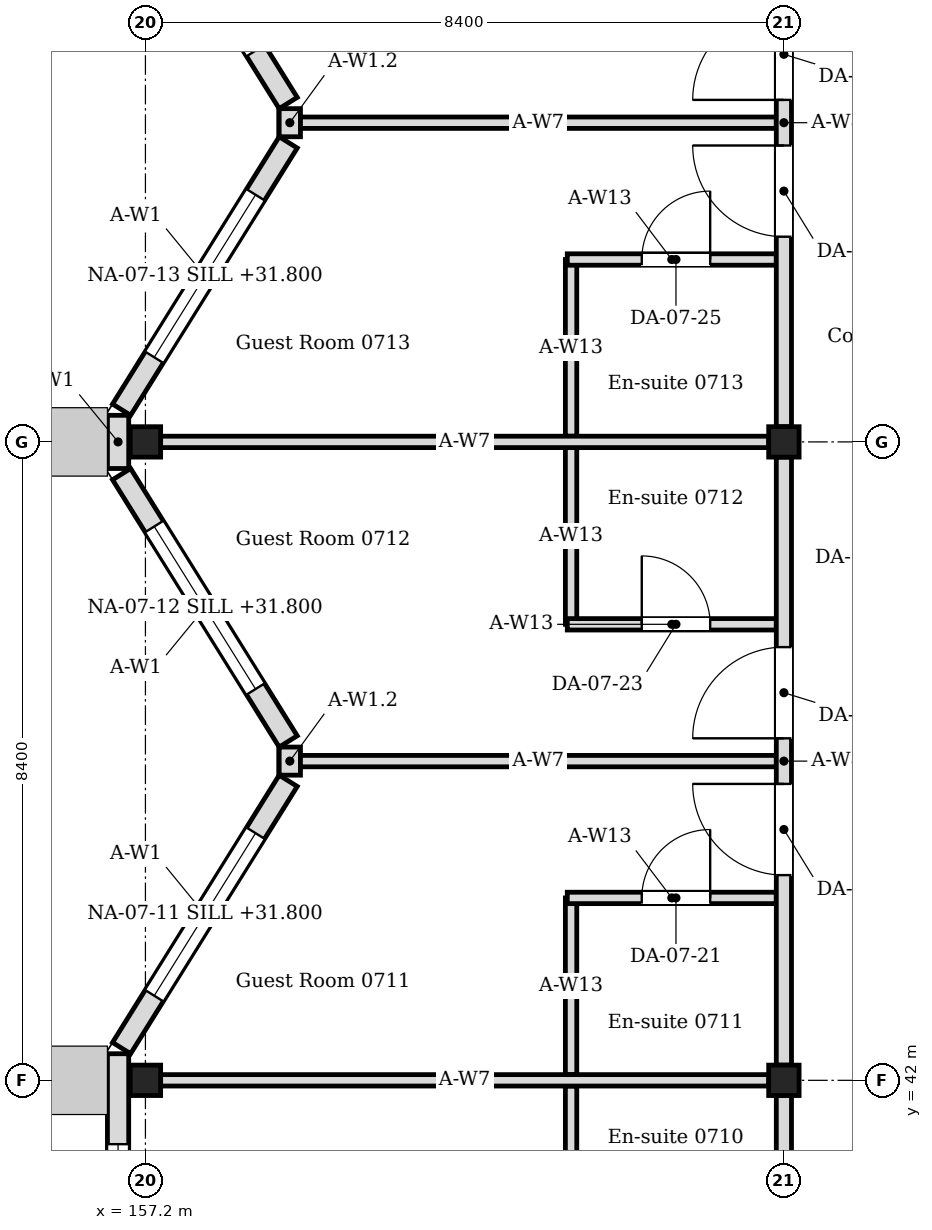
"""IFC4 building model, lengths in metres.
Left out: names, types, materials, properties, quantities, classifications, styles, units other than length and angle.
Written with IfcOpenShell. Run it as: python <this file> out.ifc"""

import sys

from ifc_helpers import new_model, si_unit, direction, frame, frame_2d, origin, origin_2d, place, context, subcontext, project, spatial, rectangle, i_section, extrude, element, fill, save


model = new_model("IFC4")
c1 = context("Model", 3, precision=1e-05, world=origin(), true_north=direction((0.0, 1.0)))
c2 = subcontext(c1, "Body", "Model", "MODEL_VIEW")
j1 = project(units=[si_unit("LENGTHUNIT", "METRE"), si_unit("PLANEANGLEUNIT", "RADIAN")], contexts=[c1])
p1 = place(None, origin())
s1 = spatial("IfcSite", under=j1, at=p1, CompositionType="ELEMENT")
p2 = place(p1, origin())
s2 = spatial("IfcBuilding", under=s1, at=p2, CompositionType="ELEMENT")
p3 = place(p2, frame((0.0, 0.0, 31.2)))
s3 = spatial("IfcBuildingStorey", under=s2, at=p3, CompositionType="ELEMENT", Elevation=31.2)
for number, where, z_axis, x_axis in (
    (1, (157.2, 42.0, 0.0), (0.0, 0.0, 1.0), (1.0, 0.0, 0.0)),
    (2, (157.2, 50.4, 0.0), (0.0, 0.0, 1.0), (1.0, 0.0, 0.0)),
    (3, (165.6, 42.0, 0.0), (0.0, 0.0, 1.0), (1.0, 0.0, 0.0)),
    (4, (165.6, 50.4, 0.0), (0.0, 0.0, 1.0), (1.0, 0.0, 0.0)),
):
    element("IfcColumn", number, at=place(p3, frame(where, z_axis=z_axis, x_axis=x_axis)), inside=s3, PredefinedType="COLUMN", context=c2, shape_type="SweptSolid", body=[
        extrude(i_section(OverallWidth=0.4, OverallDepth=0.4, WebThickness=0.013, FlangeThickness=0.021, FilletRadius=0.022, at=origin_2d()), origin(), (0.0, 0.0, 1.0), 4.2),
    ])
p4 = place(p3, frame((156.84, 16.45, 0.0), z_axis=(0.0, 0.0, 1.0), x_axis=(0.0, 1.0, 0.0)))
e5 = element("IfcWall", 5, at=p4, inside=s3, PredefinedType="SOLIDWALL", context=c2, shape_type="SweptSolid", body=[
    extrude(rectangle(XDim=25.9, YDim=0.28, at=frame_2d((12.95, 0.0))), origin(), (0.0, 0.0, 1.0), 4.05),
])
p5 = place(p4, frame((1.19, 0.0, 0.6)))
e6 = element("IfcOpeningElement", 6, at=p5, cuts=e5, PredefinedType="OPENING", context=c2, shape_type="SweptSolid", body=[
    extrude(rectangle(XDim=2.52, YDim=2.4, at=frame_2d((1.26, 1.2))), frame((0.0, 0.15, 0.0), z_axis=(0.0, -1.0, 0.0), x_axis=(1.0, 0.0, 0.0)), (0.0, 0.0, 1.0), 0.3),
])
p6 = place(p4, frame((5.39, 0.0, 0.6)))
e7 = element("IfcOpeningElement", 7, at=p6, cuts=e5, PredefinedType="OPENING", context=c2, shape_type="SweptSolid", body=[
    extrude(rectangle(XDim=2.52, YDim=2.4, at=frame_2d((1.26, 1.2))), frame((0.0, 0.15, 0.0), z_axis=(0.0, -1.0, 0.0), x_axis=(1.0, 0.0, 0.0)), (0.0, 0.0, 1.0), 0.3),
])
p7 = place(p4, frame((9.59, 0.0, 0.6)))
e8 = element("IfcOpeningElement", 8, at=p7, cuts=e5, PredefinedType="OPENING", context=c2, shape_type="SweptSolid", body=[
    extrude(rectangle(XDim=2.52, YDim=2.4, at=frame_2d((1.26, 1.2))), frame((0.0, 0.15, 0.0), z_axis=(0.0, -1.0, 0.0), x_axis=(1.0, 0.0, 0.0)), (0.0, 0.0, 1.0), 0.3),
])
p8 = place(p4, frame((13.79, 0.0, 0.6)))
e9 = element("IfcOpeningElement", 9, at=p8, cuts=e5, PredefinedType="OPENING", context=c2, shape_type="SweptSolid", body=[
    extrude(rectangle(XDim=2.52, YDim=2.4, at=frame_2d((1.26, 1.2))), frame((0.0, 0.15, 0.0), z_axis=(0.0, -1.0, 0.0), x_axis=(1.0, 0.0, 0.0)), (0.0, 0.0, 1.0), 0.3),
])
p9 = place(p4, frame((17.99, 0.0, 0.45)))
e10 = element("IfcOpeningElement", 10, at=p9, cuts=e5, PredefinedType="OPENING", context=c2, shape_type="SweptSolid", body=[
    extrude(rectangle(XDim=2.52, YDim=2.1, at=frame_2d((1.26, 1.05))), frame((0.0, 0.15, 0.0), z_axis=(0.0, -1.0, 0.0), x_axis=(1.0, 0.0, 0.0)), (0.0, 0.0, 1.0), 0.3),
])
p10 = place(p4, frame((22.19, 0.0, 0.6)))
e11 = element("IfcOpeningElement", 11, at=p10, cuts=e5, PredefinedType="OPENING", context=c2, shape_type="SweptSolid", body=[
    extrude(rectangle(XDim=2.52, YDim=2.4, at=frame_2d((1.26, 1.2))), frame((0.0, 0.15, 0.0), z_axis=(0.0, -1.0, 0.0), x_axis=(1.0, 0.0, 0.0)), (0.0, 0.0, 1.0), 0.3),
])
p11 = place(p3, frame((156.886, 42.424, 0.0), z_axis=(0.0, 0.0, 1.0), x_axis=(0.529018946142, 0.848610013271, 0.0)))
e12 = element("IfcWall", 12, at=p11, inside=s3, PredefinedType="SOLIDWALL", context=c2, shape_type="SweptSolid", body=[
    extrude(rectangle(XDim=4.144, YDim=0.28, at=frame_2d((2.072, 0.0))), origin(), (0.0, 0.0, 1.0), 4.05),
])
p12 = place(p11, frame((0.812, 0.0, 0.6)))
e13 = element("IfcOpeningElement", 13, at=p12, cuts=e12, PredefinedType="OPENING", context=c2, shape_type="SweptSolid", body=[
    extrude(rectangle(XDim=2.52, YDim=2.4, at=frame_2d((1.26, 1.2))), frame((0.0, 0.15, 0.0), z_axis=(0.0, -1.0, 0.0), x_axis=(1.0, 0.0, 0.0)), (0.0, 0.0, 1.0), 0.3),
])
p13 = place(p3, frame((159.079, 46.459, 0.0), z_axis=(0.0, 0.0, 1.0), x_axis=(-0.529018946142, 0.848610013271, 0.0)))
e14 = element("IfcWall", 14, at=p13, inside=s3, PredefinedType="SOLIDWALL", context=c2, shape_type="SweptSolid", body=[
    extrude(rectangle(XDim=4.144, YDim=0.28, at=frame_2d((2.072, 0.0))), origin(), (0.0, 0.0, 1.0), 4.05),
])
p14 = place(p13, frame((0.812, 0.0, 0.6)))
e15 = element("IfcOpeningElement", 15, at=p14, cuts=e14, PredefinedType="OPENING", context=c2, shape_type="SweptSolid", body=[
    extrude(rectangle(XDim=2.52, YDim=2.4, at=frame_2d((1.26, 1.2))), frame((0.0, 0.15, 0.0), z_axis=(0.0, -1.0, 0.0), x_axis=(1.0, 0.0, 0.0)), (0.0, 0.0, 1.0), 0.3),
])
p15 = place(p3, frame((159.1, 46.015, 0.0), z_axis=(0.0, 0.0, 1.0), x_axis=(0.0, 1.0, 0.0)))
e16 = element("IfcWall", 16, at=p15, inside=s3, PredefinedType="SOLIDWALL", context=c2, shape_type="SweptSolid", body=[
    extrude(rectangle(XDim=0.37, YDim=0.28, at=frame_2d((0.185, 0.0))), origin(), (0.0, 0.0, 1.0), 3.604),
])
p16 = place(p3, frame((156.84, 50.05, 0.0), z_axis=(0.0, 0.0, 1.0), x_axis=(0.0, 1.0, 0.0)))
e17 = element("IfcWall", 17, at=p16, inside=s3, PredefinedType="SOLIDWALL", context=c2, shape_type="SweptSolid", body=[
    extrude(rectangle(XDim=0.7, YDim=0.28, at=frame_2d((0.35, 0.0))), origin(), (0.0, 0.0, 1.0), 4.05),
])
p17 = place(p3, frame((156.886, 50.824, 0.0), z_axis=(0.0, 0.0, 1.0), x_axis=(0.529018946142, 0.848610013271, 0.0)))
e18 = element("IfcWall", 18, at=p17, inside=s3, PredefinedType="SOLIDWALL", context=c2, shape_type="SweptSolid", body=[
    extrude(rectangle(XDim=4.144, YDim=0.28, at=frame_2d((2.072, 0.0))), origin(), (0.0, 0.0, 1.0), 4.05),
])
p18 = place(p17, frame((0.812, 0.0, 0.6)))
e19 = element("IfcOpeningElement", 19, at=p18, cuts=e18, PredefinedType="OPENING", context=c2, shape_type="SweptSolid", body=[
    extrude(rectangle(XDim=2.52, YDim=2.4, at=frame_2d((1.26, 1.2))), frame((0.0, 0.15, 0.0), z_axis=(0.0, -1.0, 0.0), x_axis=(1.0, 0.0, 0.0)), (0.0, 0.0, 1.0), 0.3),
])
p19 = place(p3, frame((159.079, 54.859, 0.0), z_axis=(0.0, 0.0, 1.0), x_axis=(-0.528992500338, 0.848626498871, 0.0)))
e20 = element("IfcWall", 20, at=p19, inside=s3, PredefinedType="SOLIDWALL", context=c2, shape_type="SweptSolid", body=[
    extrude(rectangle(XDim=4.145, YDim=0.28, at=frame_2d((2.072, 0.0))), origin(), (0.0, 0.0, 1.0), 4.05),
])
p20 = place(p19, frame((0.812, 0.0, 0.6)))
e21 = element("IfcOpeningElement", 21, at=p20, cuts=e20, PredefinedType="OPENING", context=c2, shape_type="SweptSolid", body=[
    extrude(rectangle(XDim=2.52, YDim=2.4, at=frame_2d((1.26, 1.2))), frame((0.0, 0.15, 0.0), z_axis=(0.0, -1.0, 0.0), x_axis=(1.0, 0.0, 0.0)), (0.0, 0.0, 1.0), 0.3),
])
p21 = place(p3, frame((159.1, 54.415, 0.0), z_axis=(0.0, 0.0, 1.0), x_axis=(0.0, 1.0, 0.0)))
e22 = element("IfcWall", 22, at=p21, inside=s3, PredefinedType="SOLIDWALL", context=c2, shape_type="SweptSolid", body=[
    extrude(rectangle(XDim=0.37, YDim=0.28, at=frame_2d((0.185, 0.0))), origin(), (0.0, 0.0, 1.0), 3.604),
])
for number, where, z_axis, x_axis in (
    (23, (162.8, 39.6, 0.0), (0.0, 0.0, 1.0), (0.0, 1.0, 0.0)),
    (24, (162.8, 42.075, 0.0), (0.0, 0.0, 1.0), (0.0, 1.0, 0.0)),
):
    element("IfcWall", number, at=place(p3, frame(where, z_axis=z_axis, x_axis=x_axis)), inside=s3, PredefinedType="PARTITIONING", context=c2, shape_type="SweptSolid", body=[
        extrude(rectangle(XDim=2.325, YDim=0.15, at=frame_2d((1.163, 0.0))), origin(), (0.0, 0.0, 1.0), 4.05),
    ])
p22 = place(p3, frame((162.75, 44.4, 0.0), z_axis=(0.0, 0.0, 1.0), x_axis=(1.0, 0.0, 0.0)))
e25 = element("IfcWall", 25, at=p22, inside=s3, PredefinedType="PARTITIONING", context=c2, shape_type="SweptSolid", body=[
    extrude(rectangle(XDim=2.75, YDim=0.15, at=frame_2d((1.375, 0.0))), origin(), (0.0, 0.0, 1.0), 4.05),
])
p23 = place(p22, frame((0.98, 0.0, 0.0)))
e26 = element("IfcOpeningElement", 26, at=p23, cuts=e25, PredefinedType="OPENING", context=c2, shape_type="SweptSolid", body=[
    extrude(rectangle(XDim=0.9, YDim=2.1, at=frame_2d((0.45, 1.05))), frame((0.0, 0.085, 0.0), z_axis=(0.0, -1.0, 0.0), x_axis=(1.0, 0.0, 0.0)), (0.0, 0.0, 1.0), 0.17),
])
p24 = place(p3, frame((162.8, 48.0, 0.0), z_axis=(0.0, 0.0, 1.0), x_axis=(0.0, 1.0, 0.0)))
e27 = element("IfcWall", 27, at=p24, inside=s3, PredefinedType="PARTITIONING", context=c2, shape_type="SweptSolid", body=[
    extrude(rectangle(XDim=2.325, YDim=0.15, at=frame_2d((1.163, 0.0))), origin(), (0.0, 0.0, 1.0), 4.05),
])
p25 = place(p3, frame((162.75, 48.0, 0.0), z_axis=(0.0, 0.0, 1.0), x_axis=(1.0, 0.0, 0.0)))
e28 = element("IfcWall", 28, at=p25, inside=s3, PredefinedType="PARTITIONING", context=c2, shape_type="SweptSolid", body=[
    extrude(rectangle(XDim=2.75, YDim=0.15, at=frame_2d((1.375, 0.0))), origin(), (0.0, 0.0, 1.0), 4.05),
])
p26 = place(p25, frame((0.98, 0.0, 0.0)))
e29 = element("IfcOpeningElement", 29, at=p26, cuts=e28, PredefinedType="OPENING", context=c2, shape_type="SweptSolid", body=[
    extrude(rectangle(XDim=0.9, YDim=2.1, at=frame_2d((0.45, 1.05))), frame((0.0, 0.085, 0.0), z_axis=(0.0, -1.0, 0.0), x_axis=(1.0, 0.0, 0.0)), (0.0, 0.0, 1.0), 0.17),
])
p27 = place(p3, frame((162.8, 50.475, 0.0), z_axis=(0.0, 0.0, 1.0), x_axis=(0.0, 1.0, 0.0)))
e30 = element("IfcWall", 30, at=p27, inside=s3, PredefinedType="PARTITIONING", context=c2, shape_type="SweptSolid", body=[
    extrude(rectangle(XDim=2.325, YDim=0.15, at=frame_2d((1.163, 0.0))), origin(), (0.0, 0.0, 1.0), 4.05),
])
p28 = place(p3, frame((162.75, 52.8, 0.0), z_axis=(0.0, 0.0, 1.0), x_axis=(1.0, 0.0, 0.0)))
e31 = element("IfcWall", 31, at=p28, inside=s3, PredefinedType="PARTITIONING", context=c2, shape_type="SweptSolid", body=[
    extrude(rectangle(XDim=2.75, YDim=0.15, at=frame_2d((1.375, 0.0))), origin(), (0.0, 0.0, 1.0), 4.05),
])
p29 = place(p28, frame((0.98, 0.0, 0.0)))
e32 = element("IfcOpeningElement", 32, at=p29, cuts=e31, PredefinedType="OPENING", context=c2, shape_type="SweptSolid", body=[
    extrude(rectangle(XDim=0.9, YDim=2.1, at=frame_2d((0.45, 1.05))), frame((0.0, 0.085, 0.0), z_axis=(0.0, -1.0, 0.0), x_axis=(1.0, 0.0, 0.0)), (0.0, 0.0, 1.0), 0.17),
])
for number, where, z_axis, x_axis in (
    (33, (157.4, 42.0, 0.0), (0.0, 0.0, 1.0), (1.0, 0.0, 0.0)),
    (34, (157.4, 50.4, 0.0), (0.0, 0.0, 1.0), (1.0, 0.0, 0.0)),
):
    element("IfcWall", number, at=place(p3, frame(where, z_axis=z_axis, x_axis=x_axis)), inside=s3, PredefinedType="PARTITIONING", context=c2, shape_type="SweptSolid", body=[
        extrude(rectangle(XDim=8.0, YDim=0.15, at=frame_2d((4.0, 0.0))), origin(), (0.0, 0.0, 1.0), 3.604),
    ])
for number, where, z_axis, x_axis in (
    (35, (159.24, 46.2, 0.0), (0.0, 0.0, 1.0), (1.0, 0.0, 0.0)),
    (36, (159.24, 54.6, 0.0), (0.0, 0.0, 1.0), (1.0, 0.0, 0.0)),
):
    element("IfcWall", number, at=place(p3, frame(where, z_axis=z_axis, x_axis=x_axis)), inside=s3, PredefinedType="PARTITIONING", context=c2, shape_type="SweptSolid", body=[
        extrude(rectangle(XDim=6.26, YDim=0.15, at=frame_2d((3.13, 0.0))), origin(), (0.0, 0.0, 1.0), 3.604),
    ])
p30 = place(p3, frame((165.6, 33.8, 0.0), z_axis=(0.0, 0.0, 1.0), x_axis=(0.0, 1.0, 0.0)))
e37 = element("IfcWall", 37, at=p30, inside=s3, PredefinedType="PARTITIONING", context=c2, shape_type="SweptSolid", body=[
    extrude(rectangle(XDim=8.0, YDim=0.2, at=frame_2d((4.0, 0.0))), origin(), (0.0, 0.0, 1.0), 3.45),
])
p31 = place(p30, frame((2.725, 0.0, 0.0)))
e38 = element("IfcOpeningElement", 38, at=p31, cuts=e37, PredefinedType="OPENING", context=c2, shape_type="SweptSolid", body=[
    extrude(rectangle(XDim=1.15, YDim=2.1, at=frame_2d((0.575, 1.05))), frame((0.0, 0.11, 0.0), z_axis=(0.0, -1.0, 0.0), x_axis=(1.0, 0.0, 0.0)), (0.0, 0.0, 1.0), 0.22),
])
p32 = place(p30, frame((4.3, 0.0, 0.0)))
e39 = element("IfcOpeningElement", 39, at=p32, cuts=e37, PredefinedType="OPENING", context=c2, shape_type="SweptSolid", body=[
    extrude(rectangle(XDim=1.2, YDim=2.1, at=frame_2d((0.6, 1.05))), frame((0.0, 0.11, 0.0), z_axis=(0.0, -1.0, 0.0), x_axis=(1.0, 0.0, 0.0)), (0.0, 0.0, 1.0), 0.22),
])
p33 = place(p3, frame((165.6, 42.2, 0.0), z_axis=(0.0, 0.0, 1.0), x_axis=(0.0, 1.0, 0.0)))
e40 = element("IfcWall", 40, at=p33, inside=s3, PredefinedType="PARTITIONING", context=c2, shape_type="SweptSolid", body=[
    extrude(rectangle(XDim=8.0, YDim=0.2, at=frame_2d((4.0, 0.0))), origin(), (0.0, 0.0, 1.0), 3.45),
])
p34 = place(p33, frame((2.5, 0.0, 0.0)))
e41 = element("IfcOpeningElement", 41, at=p34, cuts=e40, PredefinedType="OPENING", context=c2, shape_type="SweptSolid", body=[
    extrude(rectangle(XDim=1.2, YDim=2.1, at=frame_2d((0.6, 1.05))), frame((0.0, 0.11, 0.0), z_axis=(0.0, -1.0, 0.0), x_axis=(1.0, 0.0, 0.0)), (0.0, 0.0, 1.0), 0.22),
])
p35 = place(p33, frame((4.3, 0.0, 0.0)))
e42 = element("IfcOpeningElement", 42, at=p35, cuts=e40, PredefinedType="OPENING", context=c2, shape_type="SweptSolid", body=[
    extrude(rectangle(XDim=1.2, YDim=2.1, at=frame_2d((0.6, 1.05))), frame((0.0, 0.11, 0.0), z_axis=(0.0, -1.0, 0.0), x_axis=(1.0, 0.0, 0.0)), (0.0, 0.0, 1.0), 0.22),
])
p36 = place(p3, frame((165.6, 50.6, 0.0), z_axis=(0.0, 0.0, 1.0), x_axis=(0.0, 1.0, 0.0)))
e43 = element("IfcWall", 43, at=p36, inside=s3, PredefinedType="PARTITIONING", context=c2, shape_type="SweptSolid", body=[
    extrude(rectangle(XDim=8.0, YDim=0.2, at=frame_2d((4.0, 0.0))), origin(), (0.0, 0.0, 1.0), 3.45),
])
p37 = place(p36, frame((2.5, 0.0, 0.0)))
e44 = element("IfcOpeningElement", 44, at=p37, cuts=e43, PredefinedType="OPENING", context=c2, shape_type="SweptSolid", body=[
    extrude(rectangle(XDim=1.2, YDim=2.1, at=frame_2d((0.6, 1.05))), frame((0.0, 0.11, 0.0), z_axis=(0.0, -1.0, 0.0), x_axis=(1.0, 0.0, 0.0)), (0.0, 0.0, 1.0), 0.22),
])
p38 = place(p36, frame((4.3, 0.0, 0.0)))
e45 = element("IfcOpeningElement", 45, at=p38, cuts=e43, PredefinedType="OPENING", context=c2, shape_type="SweptSolid", body=[
    extrude(rectangle(XDim=1.2, YDim=2.1, at=frame_2d((0.6, 1.05))), frame((0.0, 0.11, 0.0), z_axis=(0.0, -1.0, 0.0), x_axis=(1.0, 0.0, 0.0)), (0.0, 0.0, 1.0), 0.22),
])
p39 = place(p10, origin())
e46 = element("IfcWindow", 46, at=p39, inside=s3, PartitioningType="SINGLE_PANEL", PredefinedType="WINDOW", context=c2, shape_type="SweptSolid", body=[
    extrude(rectangle(XDim=2.52, YDim=2.4, at=frame_2d((1.26, 1.2))), frame((0.0, 0.03, 0.0), z_axis=(0.0, -1.0, 0.0), x_axis=(1.0, 0.0, 0.0)), (0.0, 0.0, 1.0), 0.06),
])
fill(e11, e46)
p40 = place(p12, origin())
e47 = element("IfcWindow", 47, at=p40, inside=s3, PartitioningType="SINGLE_PANEL", PredefinedType="WINDOW", context=c2, shape_type="SweptSolid", body=[
    extrude(rectangle(XDim=2.52, YDim=2.4, at=frame_2d((1.26, 1.2))), frame((0.0, 0.03, 0.0), z_axis=(0.0, -1.0, 0.0), x_axis=(1.0, 0.0, 0.0)), (0.0, 0.0, 1.0), 0.06),
])
fill(e13, e47)
p41 = place(p14, origin())
e48 = element("IfcWindow", 48, at=p41, inside=s3, PartitioningType="SINGLE_PANEL", PredefinedType="WINDOW", context=c2, shape_type="SweptSolid", body=[
    extrude(rectangle(XDim=2.52, YDim=2.4, at=frame_2d((1.26, 1.2))), frame((0.0, 0.03, 0.0), z_axis=(0.0, -1.0, 0.0), x_axis=(1.0, 0.0, 0.0)), (0.0, 0.0, 1.0), 0.06),
])
fill(e15, e48)
p42 = place(p18, origin())
e49 = element("IfcWindow", 49, at=p42, inside=s3, PartitioningType="SINGLE_PANEL", PredefinedType="WINDOW", context=c2, shape_type="SweptSolid", body=[
    extrude(rectangle(XDim=2.52, YDim=2.4, at=frame_2d((1.26, 1.2))), frame((0.0, 0.03, 0.0), z_axis=(0.0, -1.0, 0.0), x_axis=(1.0, 0.0, 0.0)), (0.0, 0.0, 1.0), 0.06),
])
fill(e19, e49)
p43 = place(p23, origin())
e50 = element("IfcDoor", 50, at=p43, inside=s3, OperationType="SINGLE_SWING_RIGHT", PredefinedType="DOOR", context=c2, shape_type="SweptSolid", body=[
    extrude(rectangle(XDim=0.9, YDim=2.1, at=frame_2d((0.45, 1.05))), frame((0.0, 0.025, 0.0), z_axis=(0.0, -1.0, 0.0), x_axis=(1.0, 0.0, 0.0)), (0.0, 0.0, 1.0), 0.05),
])
fill(e26, e50)
p44 = place(p34, origin())
e51 = element("IfcDoor", 51, at=p44, inside=s3, OperationType="SINGLE_SWING_RIGHT", PredefinedType="DOOR", context=c2, shape_type="SweptSolid", body=[
    extrude(rectangle(XDim=1.2, YDim=2.1, at=frame_2d((0.6, 1.05))), frame((0.0, 0.025, 0.0), z_axis=(0.0, -1.0, 0.0), x_axis=(1.0, 0.0, 0.0)), (0.0, 0.0, 1.0), 0.05),
])
fill(e41, e51)
p45 = place(p26, origin())
e52 = element("IfcDoor", 52, at=p45, inside=s3, OperationType="SINGLE_SWING_LEFT", PredefinedType="DOOR", context=c2, shape_type="SweptSolid", body=[
    extrude(rectangle(XDim=0.9, YDim=2.1, at=frame_2d((0.45, 1.05))), frame((0.0, 0.025, 0.0), z_axis=(0.0, -1.0, 0.0), x_axis=(1.0, 0.0, 0.0)), (0.0, 0.0, 1.0), 0.05),
])
fill(e29, e52)
p46 = place(p35, origin())
e53 = element("IfcDoor", 53, at=p46, inside=s3, OperationType="SINGLE_SWING_LEFT", PredefinedType="DOOR", context=c2, shape_type="SweptSolid", body=[
    extrude(rectangle(XDim=1.2, YDim=2.1, at=frame_2d((0.6, 1.05))), frame((0.0, 0.025, 0.0), z_axis=(0.0, -1.0, 0.0), x_axis=(1.0, 0.0, 0.0)), (0.0, 0.0, 1.0), 0.05),
])
fill(e42, e53)
p47 = place(p29, origin())
e54 = element("IfcDoor", 54, at=p47, inside=s3, OperationType="SINGLE_SWING_RIGHT", PredefinedType="DOOR", context=c2, shape_type="SweptSolid", body=[
    extrude(rectangle(XDim=0.9, YDim=2.1, at=frame_2d((0.45, 1.05))), frame((0.0, 0.025, 0.0), z_axis=(0.0, -1.0, 0.0), x_axis=(1.0, 0.0, 0.0)), (0.0, 0.0, 1.0), 0.05),
])
fill(e32, e54)
p48 = place(p37, origin())
e55 = element("IfcDoor", 55, at=p48, inside=s3, OperationType="SINGLE_SWING_RIGHT", PredefinedType="DOOR", context=c2, shape_type="SweptSolid", body=[
    extrude(rectangle(XDim=1.2, YDim=2.1, at=frame_2d((0.6, 1.05))), frame((0.0, 0.025, 0.0), z_axis=(0.0, -1.0, 0.0), x_axis=(1.0, 0.0, 0.0)), (0.0, 0.0, 1.0), 0.05),
])
fill(e44, e55)
p49 = place(p38, origin())
e56 = element("IfcDoor", 56, at=p49, inside=s3, OperationType="SINGLE_SWING_LEFT", PredefinedType="DOOR", context=c2, shape_type="SweptSolid", body=[
    extrude(rectangle(XDim=1.2, YDim=2.1, at=frame_2d((0.6, 1.05))), frame((0.0, 0.025, 0.0), z_axis=(0.0, -1.0, 0.0), x_axis=(1.0, 0.0, 0.0)), (0.0, 0.0, 1.0), 0.05),
])
fill(e45, e56)
save(model, sys.argv[1])
